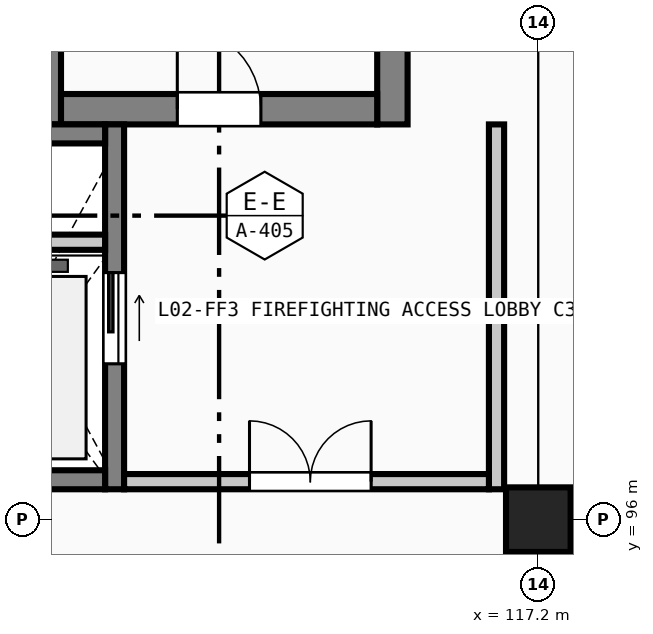
"""IFC4 building model, lengths in metres.
Left out: names, types, materials, properties, quantities, classifications, styles, units other than length and angle.
Written with IfcOpenShell. Run it as: python <this file> out.ifc"""

import sys

from ifc_helpers import new_model, si_unit, direction, frame, frame_2d, origin, origin_2d, place, context, subcontext, project, spatial, rectangle, extrude, element, fill, save


model = new_model("IFC4")
c1 = context("Model", 3, precision=1e-05, world=origin(), true_north=direction((0.0, 1.0)))
c2 = subcontext(c1, "Body", "Model", "MODEL_VIEW")
j1 = project(units=[si_unit("LENGTHUNIT", "METRE"), si_unit("PLANEANGLEUNIT", "RADIAN")], contexts=[c1])
p1 = place(None, origin())
s1 = spatial("IfcSite", under=j1, at=p1, CompositionType="ELEMENT")
p2 = place(p1, origin())
s2 = spatial("IfcBuilding", under=s1, at=p2, CompositionType="ELEMENT")
p3 = place(p2, frame((0.0, 0.0, 9.6)))
s3 = spatial("IfcBuildingStorey", under=s2, at=p3, CompositionType="ELEMENT", Elevation=9.6)
p4 = place(p3, frame((117.2, 96.0, 0.0), z_axis=(0.0, 0.0, 1.0), x_axis=(1.0, 0.0, 0.0)))
e1 = element("IfcColumn", 1, at=p4, inside=s3, PredefinedType="COLUMN", context=c2, shape_type="SweptSolid", body=[
    extrude(rectangle(XDim=0.85, YDim=0.85, at=origin_2d()), origin(), (0.0, 0.0, 1.0), 4.8),
])
for number, where, z_axis, x_axis in (
    (2, (110.72, 101.2, 0.0), (0.0, 0.0, 1.0), (0.0, 1.0, 0.0)),
    (3, (115.28, 110.4, 0.0), (0.0, 0.0, 1.0), (0.0, -1.0, 0.0)),
):
    element("IfcWall", number, at=place(p3, frame(where, z_axis=z_axis, x_axis=x_axis)), inside=s3, PredefinedType="SHEAR", context=c2, shape_type="SweptSolid", body=[
        extrude(rectangle(XDim=9.2, YDim=0.4, at=frame_2d((4.6, 0.0))), origin(), (0.0, 0.0, 1.0), 4.5),
    ])
p5 = place(p3, frame((115.08, 101.4, 0.0), z_axis=(0.0, 0.0, 1.0), x_axis=(-1.0, 0.0, 0.0)))
e4 = element("IfcWall", 4, at=p5, inside=s3, PredefinedType="SHEAR", context=c2, shape_type="SweptSolid", body=[
    extrude(rectangle(XDim=4.16, YDim=0.4, at=frame_2d((2.08, 0.0))), origin(), (0.0, 0.0, 1.0), 4.5),
])
p6 = place(p5, frame((1.53, 0.0, 0.0)))
e5 = element("IfcOpeningElement", 5, at=p6, cuts=e4, PredefinedType="OPENING", context=c2, shape_type="SweptSolid", body=[
    extrude(rectangle(XDim=1.1, YDim=2.2, at=frame_2d((0.55, 1.1))), frame((0.0, 0.21, 0.0), z_axis=(0.0, -1.0, 0.0), x_axis=(1.0, 0.0, 0.0)), (0.0, 0.0, 1.0), 0.42),
])
p7 = place(p3, frame((111.625, 101.2, 0.0), z_axis=(0.0, 0.0, 1.0), x_axis=(0.0, -1.0, 0.0)))
e6 = element("IfcWall", 6, at=p7, inside=s3, PredefinedType="SOLIDWALL", context=c2, shape_type="SweptSolid", body=[
    extrude(rectangle(XDim=4.8, YDim=0.25, at=frame_2d((2.4, 0.0))), origin(), (0.0, 0.0, 1.0), 4.5),
])
p8 = place(p7, frame((1.95, 0.0, 0.0)))
e7 = element("IfcOpeningElement", 7, at=p8, cuts=e6, PredefinedType="OPENING", context=c2, shape_type="SweptSolid", body=[
    extrude(rectangle(XDim=1.2, YDim=2.2, at=frame_2d((0.6, 1.1))), frame((0.0, 0.135, 0.0), z_axis=(0.0, -1.0, 0.0), x_axis=(1.0, 0.0, 0.0)), (0.0, 0.0, 1.0), 0.27),
])
for number, where, z_axis, x_axis in (
    (8, (111.5, 96.525, 0.0), (0.0, 0.0, 1.0), (-1.0, 0.0, 0.0)),
    (9, (109.4, 101.075, 0.0), (0.0, 0.0, 1.0), (1.0, 0.0, 0.0)),
):
    element("IfcWall", number, at=place(p3, frame(where, z_axis=z_axis, x_axis=x_axis)), inside=s3, PredefinedType="SOLIDWALL", context=c2, shape_type="SweptSolid", body=[
        extrude(rectangle(XDim=2.1, YDim=0.25, at=frame_2d((1.05, 0.0))), origin(), (0.0, 0.0, 1.0), 4.5),
    ])
p9 = place(p3, frame((109.4, 99.65, 0.0), z_axis=(0.0, 0.0, 1.0), x_axis=(1.0, 0.0, 0.0)))
e10 = element("IfcWall", 10, at=p9, inside=s3, PredefinedType="SOLIDWALL", context=c2, shape_type="SweptSolid", body=[
    extrude(rectangle(XDim=2.1, YDim=0.2, at=frame_2d((1.05, 0.0))), origin(), (0.0, 0.0, 1.0), 4.5),
])
p10 = place(p3, frame((116.65, 101.2, 0.0), z_axis=(0.0, 0.0, 1.0), x_axis=(0.0, -1.0, 0.0)))
e11 = element("IfcWall", 11, at=p10, inside=s3, PredefinedType="SOLIDWALL", context=c2, shape_type="SweptSolid", body=[
    extrude(rectangle(XDim=4.8, YDim=0.2, at=frame_2d((2.4, 0.0))), origin(), (0.0, 0.0, 1.0), 4.5),
])
p11 = place(p3, frame((116.55, 96.5, 0.0), z_axis=(0.0, 0.0, 1.0), x_axis=(-1.0, 0.0, 0.0)))
e12 = element("IfcWall", 12, at=p11, inside=s3, PredefinedType="SOLIDWALL", context=c2, shape_type="SweptSolid", body=[
    extrude(rectangle(XDim=4.8, YDim=0.2, at=frame_2d((2.4, 0.0))), origin(), (0.0, 0.0, 1.0), 4.5),
])
p12 = place(p11, frame((1.55, 0.0, 0.0)))
e13 = element("IfcOpeningElement", 13, at=p12, cuts=e12, PredefinedType="OPENING", context=c2, shape_type="SweptSolid", body=[
    extrude(rectangle(XDim=1.6, YDim=2.2, at=frame_2d((0.8, 1.1))), frame((0.0, 0.11, 0.0), z_axis=(0.0, -1.0, 0.0), x_axis=(1.0, 0.0, 0.0)), (0.0, 0.0, 1.0), 0.22),
])
p13 = place(p6, frame((1.1, 0.0, 0.0), z_axis=(0.0, 0.0, 1.0), x_axis=(-1.0, 0.0, 0.0)))
e14 = element("IfcDoor", 14, at=p13, inside=s3, OperationType="SINGLE_SWING_LEFT", PredefinedType="DOOR", context=c2, shape_type="SweptSolid", body=[
    extrude(rectangle(XDim=1.1, YDim=2.2, at=frame_2d((0.55, 1.1))), frame((0.0, 0.025, 0.0), z_axis=(0.0, -1.0, 0.0), x_axis=(1.0, 0.0, 0.0)), (0.0, 0.0, 1.0), 0.05),
])
fill(e5, e14)
p14 = place(p8, origin())
e15 = element("IfcDoor", 15, at=p14, inside=s3, OperationType="SLIDING_TO_LEFT", PredefinedType="DOOR", context=c2, shape_type="SweptSolid", body=[
    extrude(rectangle(XDim=1.2, YDim=2.2, at=frame_2d((0.6, 1.1))), frame((0.0, 0.025, 0.0), z_axis=(0.0, -1.0, 0.0), x_axis=(1.0, 0.0, 0.0)), (0.0, 0.0, 1.0), 0.05),
])
fill(e7, e15)
p15 = place(p12, frame((1.6, 0.0, 0.0), z_axis=(0.0, 0.0, 1.0), x_axis=(-1.0, 0.0, 0.0)))
e16 = element("IfcDoor", 16, at=p15, inside=s3, OperationType="DOUBLE_DOOR_SINGLE_SWING", PredefinedType="DOOR", context=c2, shape_type="SweptSolid", body=[
    extrude(rectangle(XDim=1.6, YDim=2.2, at=frame_2d((0.8, 1.1))), frame((0.0, 0.025, 0.0), z_axis=(0.0, -1.0, 0.0), x_axis=(1.0, 0.0, 0.0)), (0.0, 0.0, 1.0), 0.05),
])
fill(e13, e16)
save(model, sys.argv[1])
